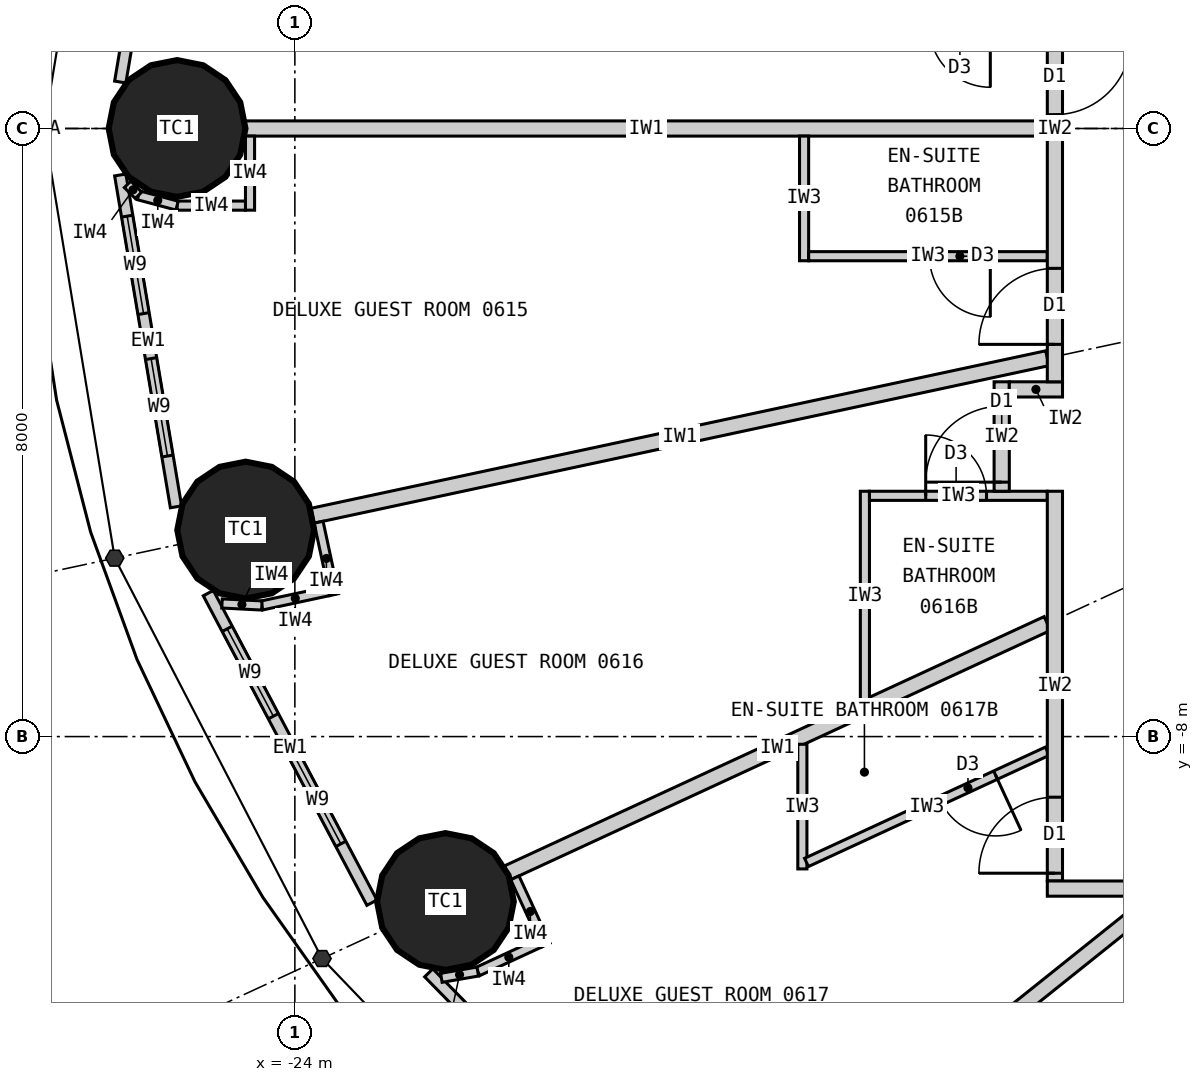
"""IFC4 building model, lengths in metres.
Left out: names, types, materials, properties, quantities, classifications, styles, units other than length and angle.
Written with IfcOpenShell. Run it as: python <this file> out.ifc"""

import sys

from ifc_helpers import new_model, si_unit, direction, frame, frame_2d, origin, origin_2d, place, context, subcontext, project, spatial, rectangle, circle, extrude, element, fill, save


model = new_model("IFC4")
c1 = context("Model", 3, precision=1e-05, world=origin(), true_north=direction((0.0, 1.0)))
c2 = subcontext(c1, "Body", "Model", "MODEL_VIEW")
j1 = project(units=[si_unit("LENGTHUNIT", "METRE"), si_unit("PLANEANGLEUNIT", "RADIAN")], contexts=[c1])
p1 = place(None, origin())
s1 = spatial("IfcSite", under=j1, at=p1, CompositionType="ELEMENT")
p2 = place(p1, origin())
s2 = spatial("IfcBuilding", under=s1, at=p2, CompositionType="ELEMENT")
p3 = place(p2, frame((0.0, 0.0, 32.7)))
s3 = spatial("IfcBuildingStorey", under=s2, at=p3, CompositionType="ELEMENT", Elevation=32.7)
for number, where, z_axis, x_axis in (
    (1, (-25.55, 0.0, 0.0), (0.0, 0.0, 1.0), (1.0, 0.0, 0.0)),
    (2, (-24.647, -5.283, 0.0), (0.0, 0.0, 1.0), (1.0, 0.0, 0.0)),
    (3, (-22.019, -10.17, 0.0), (0.0, 0.0, 1.0), (1.0, 0.0, 0.0)),
):
    element("IfcColumn", number, at=place(p3, frame(where, z_axis=z_axis, x_axis=x_axis)), inside=s3, PredefinedType="COLUMN", context=c2, shape_type="SweptSolid", body=[
        extrude(circle(Radius=0.9, at=origin_2d()), origin(), (0.0, 0.0, 1.0), 3.3),
    ])
p4 = place(p3, frame((-25.564, 4.978, 0.0), z_axis=(0.0, 0.0, 1.0), x_axis=(-0.165641751141, -0.986185991727, 0.0)))
e4 = element("IfcWall", 4, at=p4, inside=s3, PredefinedType="ELEMENTEDWALL", context=c2, shape_type="SweptSolid", body=[
    extrude(rectangle(XDim=4.428, YDim=0.15, at=frame_2d((2.214, 0.0))), origin(), (0.0, 0.0, 1.0), 3.12),
])
p5 = place(p4, frame((0.678, 0.0, 0.9)))
e5 = element("IfcOpeningElement", 5, at=p5, cuts=e4, PredefinedType="OPENING", context=c2, shape_type="SweptSolid", body=[
    extrude(rectangle(XDim=1.3, YDim=1.9, at=frame_2d((0.65, 0.95))), frame((0.0, 0.085, 0.0), z_axis=(0.0, -1.0, 0.0), x_axis=(1.0, 0.0, 0.0)), (0.0, 0.0, 1.0), 0.17),
])
p6 = place(p4, frame((2.578, 0.0, 0.9)))
e6 = element("IfcOpeningElement", 6, at=p6, cuts=e4, PredefinedType="OPENING", context=c2, shape_type="SweptSolid", body=[
    extrude(rectangle(XDim=1.3, YDim=1.9, at=frame_2d((0.65, 0.95))), frame((0.0, 0.085, 0.0), z_axis=(0.0, -1.0, 0.0), x_axis=(1.0, 0.0, 0.0)), (0.0, 0.0, 1.0), 0.17),
])
p7 = place(p3, frame((-26.297, -0.611, 0.0), z_axis=(0.0, 0.0, 1.0), x_axis=(0.165641751141, -0.986185991727, 0.0)))
e7 = element("IfcWall", 7, at=p7, inside=s3, PredefinedType="ELEMENTEDWALL", context=c2, shape_type="SweptSolid", body=[
    extrude(rectangle(XDim=4.428, YDim=0.15, at=frame_2d((2.214, 0.0))), origin(), (0.0, 0.0, 1.0), 3.12),
])
p8 = place(p7, frame((0.55, 0.0, 0.9)))
e8 = element("IfcOpeningElement", 8, at=p8, cuts=e7, PredefinedType="OPENING", context=c2, shape_type="SweptSolid", body=[
    extrude(rectangle(XDim=1.3, YDim=1.9, at=frame_2d((0.65, 0.95))), frame((0.0, 0.085, 0.0), z_axis=(0.0, -1.0, 0.0), x_axis=(1.0, 0.0, 0.0)), (0.0, 0.0, 1.0), 0.17),
])
p9 = place(p7, frame((2.45, 0.0, 0.9)))
e9 = element("IfcOpeningElement", 9, at=p9, cuts=e7, PredefinedType="OPENING", context=c2, shape_type="SweptSolid", body=[
    extrude(rectangle(XDim=1.3, YDim=1.9, at=frame_2d((0.65, 0.95))), frame((0.0, 0.085, 0.0), z_axis=(0.0, -1.0, 0.0), x_axis=(1.0, 0.0, 0.0)), (0.0, 0.0, 1.0), 0.17),
])
p10 = place(p3, frame((-25.139, -6.113, 0.0), z_axis=(0.0, 0.0, 1.0), x_axis=(0.467303182954, -0.884097129959, 0.0)))
e10 = element("IfcWall", 10, at=p10, inside=s3, PredefinedType="ELEMENTEDWALL", context=c2, shape_type="SweptSolid", body=[
    extrude(rectangle(XDim=4.606, YDim=0.15, at=frame_2d((2.303, 0.0))), origin(), (0.0, 0.0, 1.0), 3.12),
])
p11 = place(p10, frame((0.531, 0.0, 0.9)))
e11 = element("IfcOpeningElement", 11, at=p11, cuts=e10, PredefinedType="OPENING", context=c2, shape_type="SweptSolid", body=[
    extrude(rectangle(XDim=1.3, YDim=1.9, at=frame_2d((0.65, 0.95))), frame((0.0, 0.085, 0.0), z_axis=(0.0, -1.0, 0.0), x_axis=(1.0, 0.0, 0.0)), (0.0, 0.0, 1.0), 0.17),
])
p12 = place(p10, frame((2.432, 0.0, 0.9)))
e12 = element("IfcOpeningElement", 12, at=p12, cuts=e10, PredefinedType="OPENING", context=c2, shape_type="SweptSolid", body=[
    extrude(rectangle(XDim=1.3, YDim=1.9, at=frame_2d((0.65, 0.95))), frame((0.0, 0.085, 0.0), z_axis=(0.0, -1.0, 0.0), x_axis=(1.0, 0.0, 0.0)), (0.0, 0.0, 1.0), 0.17),
])
p13 = place(p3, frame((-22.239, -11.108, 0.0), z_axis=(0.0, 0.0, 1.0), x_axis=(0.699612594083, -0.714522370679, 0.0)))
e13 = element("IfcWall", 13, at=p13, inside=s3, PredefinedType="ELEMENTEDWALL", context=c2, shape_type="SweptSolid", body=[
    extrude(rectangle(XDim=4.896, YDim=0.15, at=frame_2d((2.448, 0.0))), origin(), (0.0, 0.0, 1.0), 3.12),
])
p14 = place(p13, frame((0.619, 0.0, 0.9)))
e14 = element("IfcOpeningElement", 14, at=p14, cuts=e13, PredefinedType="OPENING", context=c2, shape_type="SweptSolid", body=[
    extrude(rectangle(XDim=1.3, YDim=1.9, at=frame_2d((0.65, 0.95))), frame((0.0, 0.085, 0.0), z_axis=(0.0, -1.0, 0.0), x_axis=(1.0, 0.0, 0.0)), (0.0, 0.0, 1.0), 0.17),
])
p15 = place(p13, frame((2.519, 0.0, 0.9)))
e15 = element("IfcOpeningElement", 15, at=p15, cuts=e13, PredefinedType="OPENING", context=c2, shape_type="SweptSolid", body=[
    extrude(rectangle(XDim=1.3, YDim=1.9, at=frame_2d((0.65, 0.95))), frame((0.0, 0.085, 0.0), z_axis=(0.0, -1.0, 0.0), x_axis=(1.0, 0.0, 0.0)), (0.0, 0.0, 1.0), 0.17),
])
p16 = place(p3, frame((-14.1, 0.0, 0.0), z_axis=(0.0, 0.0, 1.0), x_axis=(-1.0, 0.0, 0.0)))
e16 = element("IfcWall", 16, at=p16, inside=s3, PredefinedType="PARTITIONING", context=c2, shape_type="SweptSolid", body=[
    extrude(rectangle(XDim=10.55, YDim=0.2, at=frame_2d((5.275, 0.0))), origin(), (0.0, 0.0, 1.0), 2.27),
])
p17 = place(p3, frame((-14.1, -3.022, 0.0), z_axis=(0.0, 0.0, 1.0), x_axis=(-0.977786510688, -0.209603290805, 0.0)))
e17 = element("IfcWall", 17, at=p17, inside=s3, PredefinedType="PARTITIONING", context=c2, shape_type="SweptSolid", body=[
    extrude(rectangle(XDim=9.887, YDim=0.2, at=frame_2d((4.943, 0.0))), origin(), (0.0, 0.0, 1.0), 2.32),
])
p18 = place(p3, frame((-14.1, -6.512, 0.0), z_axis=(0.0, 0.0, 1.0), x_axis=(-0.907842433118, -0.41931147925, 0.0)))
e18 = element("IfcWall", 18, at=p18, inside=s3, PredefinedType="PARTITIONING", context=c2, shape_type="SweptSolid", body=[
    extrude(rectangle(XDim=7.823, YDim=0.2, at=frame_2d((3.912, 0.0))), origin(), (0.0, 0.0, 1.0), 2.32),
])
p19 = place(p3, frame((-12.625, -10.1, 0.0), z_axis=(0.0, 0.0, 1.0), x_axis=(-0.780872884676, -0.624689953479, 0.0)))
e19 = element("IfcWall", 19, at=p19, inside=s3, PredefinedType="PARTITIONING", context=c2, shape_type="SweptSolid", body=[
    extrude(rectangle(XDim=5.845, YDim=0.2, at=frame_2d((2.922, 0.0))), origin(), (0.0, 0.0, 1.0), 2.32),
])
p20 = place(p3, frame((-17.3, -0.1, 0.0), z_axis=(0.0, 0.0, 1.0), x_axis=(0.0, -1.0, 0.0)))
e20 = element("IfcWall", 20, at=p20, inside=s3, PredefinedType="PARTITIONING", context=c2, shape_type="SweptSolid", body=[
    extrude(rectangle(XDim=1.64, YDim=0.12, at=frame_2d((0.82, 0.0))), origin(), (0.0, 0.0, 1.0), 3.12),
])
p21 = place(p3, frame((-14.1, -1.68, 0.0), z_axis=(0.0, 0.0, 1.0), x_axis=(-1.0, 0.0, 0.0)))
e21 = element("IfcWall", 21, at=p21, inside=s3, PredefinedType="PARTITIONING", context=c2, shape_type="SweptSolid", body=[
    extrude(rectangle(XDim=3.14, YDim=0.12, at=frame_2d((1.57, 0.0))), origin(), (0.0, 0.0, 1.0), 3.12),
])
p22 = place(p21, frame((0.75, 0.0, 0.0)))
e22 = element("IfcOpeningElement", 22, at=p22, cuts=e21, PredefinedType="OPENING", context=c2, shape_type="SweptSolid", body=[
    extrude(rectangle(XDim=0.8, YDim=2.1, at=frame_2d((0.4, 1.05))), frame((0.0, 0.07, 0.0), z_axis=(0.0, -1.0, 0.0), x_axis=(1.0, 0.0, 0.0)), (0.0, 0.0, 1.0), 0.14),
])
p23 = place(p3, frame((-16.5, -7.521, 0.0), z_axis=(0.0, 0.0, 1.0), x_axis=(0.0, 1.0, 0.0)))
e23 = element("IfcWall", 23, at=p23, inside=s3, PredefinedType="PARTITIONING", context=c2, shape_type="SweptSolid", body=[
    extrude(rectangle(XDim=2.749, YDim=0.12, at=frame_2d((1.374, 0.0))), origin(), (0.0, 0.0, 1.0), 3.12),
])
p24 = place(p3, frame((-14.1, -4.833, 0.0), z_axis=(0.0, 0.0, 1.0), x_axis=(-1.0, 0.0, 0.0)))
e24 = element("IfcWall", 24, at=p24, inside=s3, PredefinedType="PARTITIONING", context=c2, shape_type="SweptSolid", body=[
    extrude(rectangle(XDim=2.34, YDim=0.12, at=frame_2d((1.17, 0.0))), origin(), (0.0, 0.0, 1.0), 3.12),
])
p25 = place(p24, frame((0.8, 0.0, 0.0)))
e25 = element("IfcOpeningElement", 25, at=p25, cuts=e24, PredefinedType="OPENING", context=c2, shape_type="SweptSolid", body=[
    extrude(rectangle(XDim=0.8, YDim=2.1, at=frame_2d((0.4, 1.05))), frame((0.0, 0.07, 0.0), z_axis=(0.0, -1.0, 0.0), x_axis=(1.0, 0.0, 0.0)), (0.0, 0.0, 1.0), 0.14),
])
p26 = place(p3, frame((-17.323, -8.101, 0.0), z_axis=(0.0, 0.0, 1.0), x_axis=(0.0, -1.0, 0.0)))
e26 = element("IfcWall", 26, at=p26, inside=s3, PredefinedType="PARTITIONING", context=c2, shape_type="SweptSolid", body=[
    extrude(rectangle(XDim=1.64, YDim=0.12, at=frame_2d((0.82, 0.0))), origin(), (0.0, 0.0, 1.0), 3.12),
])
p27 = place(p3, frame((-14.1, -8.193, 0.0), z_axis=(0.0, 0.0, 1.0), x_axis=(-0.907836493557, -0.419324338628, 0.0)))
e27 = element("IfcWall", 27, at=p27, inside=s3, PredefinedType="PARTITIONING", context=c2, shape_type="SweptSolid", body=[
    extrude(rectangle(XDim=3.49, YDim=0.12, at=frame_2d((1.745, 0.0))), origin(), (0.0, 0.0, 1.0), 3.12),
])
p28 = place(p27, frame((0.75, 0.0, 0.0)))
e28 = element("IfcOpeningElement", 28, at=p28, cuts=e27, PredefinedType="OPENING", context=c2, shape_type="SweptSolid", body=[
    extrude(rectangle(XDim=0.8, YDim=2.1, at=frame_2d((0.4, 1.05))), frame((0.0, 0.07, 0.0), z_axis=(0.0, -1.0, 0.0), x_axis=(1.0, 0.0, 0.0)), (0.0, 0.0, 1.0), 0.14),
])
p29 = place(p3, frame((-14.7, -3.333, 0.0), z_axis=(0.0, 0.0, 1.0), x_axis=(0.0, -1.0, 0.0)))
e29 = element("IfcWall", 29, at=p29, inside=s3, PredefinedType="PARTITIONING", context=c2, shape_type="SweptSolid", body=[
    extrude(rectangle(XDim=1.44, YDim=0.2, at=frame_2d((0.72, 0.0))), origin(), (0.0, 0.0, 1.0), 3.12),
])
p30 = place(p29, frame((0.32, 0.0, 0.0)))
e30 = element("IfcOpeningElement", 30, at=p30, cuts=e29, PredefinedType="OPENING", context=c2, shape_type="SweptSolid", body=[
    extrude(rectangle(XDim=1.0, YDim=2.2, at=frame_2d((0.5, 1.1))), frame((0.0, 0.11, 0.0), z_axis=(0.0, -1.0, 0.0), x_axis=(1.0, 0.0, 0.0)), (0.0, 0.0, 1.0), 0.22),
])
p31 = place(p3, frame((-13.9, -3.433, 0.0), z_axis=(0.0, 0.0, 1.0), x_axis=(-1.0, 0.0, 0.0)))
e31 = element("IfcWall", 31, at=p31, inside=s3, PredefinedType="PARTITIONING", context=c2, shape_type="SweptSolid", body=[
    extrude(rectangle(XDim=0.7, YDim=0.2, at=frame_2d((0.35, 0.0))), origin(), (0.0, 0.0, 1.0), 2.32),
])
p32 = place(p3, frame((-14.0, 3.333, 0.0), z_axis=(0.0, 0.0, 1.0), x_axis=(0.0, -1.0, 0.0)))
e32 = element("IfcWall", 32, at=p32, inside=s3, PredefinedType="PARTITIONING", context=c2, shape_type="SweptSolid", body=[
    extrude(rectangle(XDim=6.665, YDim=0.2, at=frame_2d((3.333, 0.0))), origin(), (0.0, 0.0, 1.0), 3.12),
])
p33 = place(p32, frame((2.15, 0.0, 0.0)))
e33 = element("IfcOpeningElement", 33, at=p33, cuts=e32, PredefinedType="OPENING", context=c2, shape_type="SweptSolid", body=[
    extrude(rectangle(XDim=1.0, YDim=2.2, at=frame_2d((0.5, 1.1))), frame((0.0, 0.11, 0.0), z_axis=(0.0, -1.0, 0.0), x_axis=(1.0, 0.0, 0.0)), (0.0, 0.0, 1.0), 0.22),
])
p34 = place(p32, frame((5.173, 0.0, 0.0)))
e34 = element("IfcOpeningElement", 34, at=p34, cuts=e32, PredefinedType="OPENING", context=c2, shape_type="SweptSolid", body=[
    extrude(rectangle(XDim=1.0, YDim=2.2, at=frame_2d((0.5, 1.1))), frame((0.0, 0.11, 0.0), z_axis=(0.0, -1.0, 0.0), x_axis=(1.0, 0.0, 0.0)), (0.0, 0.0, 1.0), 0.22),
])
p35 = place(p3, frame((-14.0, -4.772, 0.0), z_axis=(0.0, 0.0, 1.0), x_axis=(0.0, -1.0, 0.0)))
e35 = element("IfcWall", 35, at=p35, inside=s3, PredefinedType="PARTITIONING", context=c2, shape_type="SweptSolid", body=[
    extrude(rectangle(XDim=5.127, YDim=0.2, at=frame_2d((2.564, 0.0))), origin(), (0.0, 0.0, 1.0), 3.12),
])
p36 = place(p35, frame((4.025, 0.0, 0.0)))
e36 = element("IfcOpeningElement", 36, at=p36, cuts=e35, PredefinedType="OPENING", context=c2, shape_type="SweptSolid", body=[
    extrude(rectangle(XDim=1.0, YDim=2.2, at=frame_2d((0.5, 1.1))), frame((0.0, 0.11, 0.0), z_axis=(0.0, -1.0, 0.0), x_axis=(1.0, 0.0, 0.0)), (0.0, 0.0, 1.0), 0.22),
])
p37 = place(p3, frame((-3.499, -10.0, 0.0), z_axis=(0.0, 0.0, 1.0), x_axis=(-1.0, 0.0, 0.0)))
e37 = element("IfcWall", 37, at=p37, inside=s3, PredefinedType="PARTITIONING", context=c2, shape_type="SweptSolid", body=[
    extrude(rectangle(XDim=10.602, YDim=0.2, at=frame_2d((5.301, 0.0))), origin(), (0.0, 0.0, 1.0), 3.12),
])
p38 = place(p37, frame((4.846, 0.0, 0.0)))
e38 = element("IfcOpeningElement", 38, at=p38, cuts=e37, PredefinedType="OPENING", context=c2, shape_type="SweptSolid", body=[
    extrude(rectangle(XDim=1.0, YDim=2.2, at=frame_2d((0.5, 1.1))), frame((0.0, 0.11, 0.0), z_axis=(0.0, -1.0, 0.0), x_axis=(1.0, 0.0, 0.0)), (0.0, 0.0, 1.0), 0.22),
])
p39 = place(p3, frame((-24.59, -0.1, 0.0), z_axis=(0.0, 0.0, 1.0), x_axis=(0.0, -1.0, 0.0)))
e39 = element("IfcWall", 39, at=p39, inside=s3, PredefinedType="PARTITIONING", context=c2, shape_type="SweptSolid", body=[
    extrude(rectangle(XDim=0.974, YDim=0.12, at=frame_2d((0.487, 0.0))), origin(), (0.0, 0.0, 1.0), 3.12),
])
p40 = place(p3, frame((-24.65, -1.015, 0.0), z_axis=(0.0, 0.0, 1.0), x_axis=(-1.0, 0.0, 0.0)))
e40 = element("IfcWall", 40, at=p40, inside=s3, PredefinedType="PARTITIONING", context=c2, shape_type="SweptSolid", body=[
    extrude(rectangle(XDim=0.9, YDim=0.12, at=frame_2d((0.45, 0.0))), origin(), (0.0, 0.0, 1.0), 3.12),
])
p41 = place(p3, frame((-25.55, -1.015, 0.0), z_axis=(0.0, 0.0, 1.0), x_axis=(-0.96590239779, 0.258906465625, 0.0)))
e41 = element("IfcWall", 41, at=p41, inside=s3, PredefinedType="PARTITIONING", context=c2, shape_type="SweptSolid", body=[
    extrude(rectangle(XDim=0.525, YDim=0.12, at=frame_2d((0.263, 0.0))), origin(), (0.0, 0.0, 1.0), 3.12),
])
p42 = place(p3, frame((-26.057, -0.879, 0.0), z_axis=(0.0, 0.0, 1.0), x_axis=(-0.707106781187, 0.707106781187, 0.0)))
e42 = element("IfcWall", 42, at=p42, inside=s3, PredefinedType="PARTITIONING", context=c2, shape_type="SweptSolid", body=[
    extrude(rectangle(XDim=0.204, YDim=0.12, at=frame_2d((0.102, 0.0))), origin(), (0.0, 0.0, 1.0), 3.12),
])
p43 = place(p3, frame((-23.687, -5.18, 0.0), z_axis=(0.0, 0.0, 1.0), x_axis=(0.209443540911, -0.977820741839, 0.0)))
e43 = element("IfcWall", 43, at=p43, inside=s3, PredefinedType="PARTITIONING", context=c2, shape_type="SweptSolid", body=[
    extrude(rectangle(XDim=0.975, YDim=0.12, at=frame_2d((0.487, 0.0))), origin(), (0.0, 0.0, 1.0), 3.12),
])
p44 = place(p3, frame((-23.554, -6.087, 0.0), z_axis=(0.0, 0.0, 1.0), x_axis=(-0.977762694187, -0.209714362543, 0.0)))
e44 = element("IfcWall", 44, at=p44, inside=s3, PredefinedType="PARTITIONING", context=c2, shape_type="SweptSolid", body=[
    extrude(rectangle(XDim=0.9, YDim=0.12, at=frame_2d((0.45, 0.0))), origin(), (0.0, 0.0, 1.0), 3.12),
])
p45 = place(p3, frame((-24.434, -6.275, 0.0), z_axis=(0.0, 0.0, 1.0), x_axis=(-0.998714959873, 0.050679669751, 0.0)))
e45 = element("IfcWall", 45, at=p45, inside=s3, PredefinedType="PARTITIONING", context=c2, shape_type="SweptSolid", body=[
    extrude(rectangle(XDim=0.525, YDim=0.12, at=frame_2d((0.263, 0.0))), origin(), (0.0, 0.0, 1.0), 3.12),
])
p46 = place(p3, frame((-21.106, -9.858, 0.0), z_axis=(0.0, 0.0, 1.0), x_axis=(0.419344098106, -0.907827366509, 0.0)))
e46 = element("IfcWall", 46, at=p46, inside=s3, PredefinedType="PARTITIONING", context=c2, shape_type="SweptSolid", body=[
    extrude(rectangle(XDim=0.975, YDim=0.12, at=frame_2d((0.487, 0.0))), origin(), (0.0, 0.0, 1.0), 3.12),
])
p47 = place(p3, frame((-20.777, -10.714, 0.0), z_axis=(0.0, 0.0, 1.0), x_axis=(-0.907832324198, -0.419333365166, 0.0)))
e47 = element("IfcWall", 47, at=p47, inside=s3, PredefinedType="PARTITIONING", context=c2, shape_type="SweptSolid", body=[
    extrude(rectangle(XDim=0.9, YDim=0.12, at=frame_2d((0.45, 0.0))), origin(), (0.0, 0.0, 1.0), 3.12),
])
p48 = place(p3, frame((-21.594, -11.091, 0.0), z_axis=(0.0, 0.0, 1.0), x_axis=(-0.985483306792, -0.169772353566, 0.0)))
e48 = element("IfcWall", 48, at=p48, inside=s3, PredefinedType="PARTITIONING", context=c2, shape_type="SweptSolid", body=[
    extrude(rectangle(XDim=0.486, YDim=0.12, at=frame_2d((0.243, 0.0))), origin(), (0.0, 0.0, 1.0), 3.12),
])
p49 = place(p8, origin())
e49 = element("IfcWindow", 49, at=p49, inside=s3, PartitioningType="SINGLE_PANEL", PredefinedType="WINDOW", context=c2, shape_type="SweptSolid", body=[
    extrude(rectangle(XDim=1.3, YDim=1.9, at=frame_2d((0.65, 0.95))), frame((0.0, 0.03, 0.0), z_axis=(0.0, -1.0, 0.0), x_axis=(1.0, 0.0, 0.0)), (0.0, 0.0, 1.0), 0.06),
])
fill(e8, e49)
p50 = place(p9, origin())
e50 = element("IfcWindow", 50, at=p50, inside=s3, PartitioningType="SINGLE_PANEL", PredefinedType="WINDOW", context=c2, shape_type="SweptSolid", body=[
    extrude(rectangle(XDim=1.3, YDim=1.9, at=frame_2d((0.65, 0.95))), frame((0.0, 0.03, 0.0), z_axis=(0.0, -1.0, 0.0), x_axis=(1.0, 0.0, 0.0)), (0.0, 0.0, 1.0), 0.06),
])
fill(e9, e50)
p51 = place(p11, origin())
e51 = element("IfcWindow", 51, at=p51, inside=s3, PartitioningType="SINGLE_PANEL", PredefinedType="WINDOW", context=c2, shape_type="SweptSolid", body=[
    extrude(rectangle(XDim=1.3, YDim=1.9, at=frame_2d((0.65, 0.95))), frame((0.0, 0.03, 0.0), z_axis=(0.0, -1.0, 0.0), x_axis=(1.0, 0.0, 0.0)), (0.0, 0.0, 1.0), 0.06),
])
fill(e11, e51)
p52 = place(p12, origin())
e52 = element("IfcWindow", 52, at=p52, inside=s3, PartitioningType="SINGLE_PANEL", PredefinedType="WINDOW", context=c2, shape_type="SweptSolid", body=[
    extrude(rectangle(XDim=1.3, YDim=1.9, at=frame_2d((0.65, 0.95))), frame((0.0, 0.03, 0.0), z_axis=(0.0, -1.0, 0.0), x_axis=(1.0, 0.0, 0.0)), (0.0, 0.0, 1.0), 0.06),
])
fill(e12, e52)
p53 = place(p33, origin())
e53 = element("IfcDoor", 53, at=p53, inside=s3, OperationType="SINGLE_SWING_LEFT", PredefinedType="DOOR", context=c2, shape_type="SweptSolid", body=[
    extrude(rectangle(XDim=1.0, YDim=2.2, at=frame_2d((0.5, 1.1))), frame((0.0, 0.025, 0.0), z_axis=(0.0, -1.0, 0.0), x_axis=(1.0, 0.0, 0.0)), (0.0, 0.0, 1.0), 0.05),
])
fill(e33, e53)
p54 = place(p22, origin())
e54 = element("IfcDoor", 54, at=p54, inside=s3, OperationType="SINGLE_SWING_LEFT", PredefinedType="DOOR", context=c2, shape_type="SweptSolid", body=[
    extrude(rectangle(XDim=0.8, YDim=2.1, at=frame_2d((0.4, 1.05))), frame((0.0, 0.025, 0.0), z_axis=(0.0, -1.0, 0.0), x_axis=(1.0, 0.0, 0.0)), (0.0, 0.0, 1.0), 0.05),
])
fill(e22, e54)
p55 = place(p34, origin())
e55 = element("IfcDoor", 55, at=p55, inside=s3, OperationType="SINGLE_SWING_RIGHT", PredefinedType="DOOR", context=c2, shape_type="SweptSolid", body=[
    extrude(rectangle(XDim=1.0, YDim=2.2, at=frame_2d((0.5, 1.1))), frame((0.0, 0.025, 0.0), z_axis=(0.0, -1.0, 0.0), x_axis=(1.0, 0.0, 0.0)), (0.0, 0.0, 1.0), 0.05),
])
fill(e34, e55)
p56 = place(p25, origin())
e56 = element("IfcDoor", 56, at=p56, inside=s3, OperationType="SINGLE_SWING_RIGHT", PredefinedType="DOOR", context=c2, shape_type="SweptSolid", body=[
    extrude(rectangle(XDim=0.8, YDim=2.1, at=frame_2d((0.4, 1.05))), frame((0.0, 0.025, 0.0), z_axis=(0.0, -1.0, 0.0), x_axis=(1.0, 0.0, 0.0)), (0.0, 0.0, 1.0), 0.05),
])
fill(e25, e56)
p57 = place(p30, origin())
e57 = element("IfcDoor", 57, at=p57, inside=s3, OperationType="SINGLE_SWING_RIGHT", PredefinedType="DOOR", context=c2, shape_type="SweptSolid", body=[
    extrude(rectangle(XDim=1.0, YDim=2.2, at=frame_2d((0.5, 1.1))), frame((0.0, 0.025, 0.0), z_axis=(0.0, -1.0, 0.0), x_axis=(1.0, 0.0, 0.0)), (0.0, 0.0, 1.0), 0.05),
])
fill(e30, e57)
p58 = place(p28, origin())
e58 = element("IfcDoor", 58, at=p58, inside=s3, OperationType="SINGLE_SWING_LEFT", PredefinedType="DOOR", context=c2, shape_type="SweptSolid", body=[
    extrude(rectangle(XDim=0.8, YDim=2.1, at=frame_2d((0.4, 1.05))), frame((0.0, 0.025, 0.0), z_axis=(0.0, -1.0, 0.0), x_axis=(1.0, 0.0, 0.0)), (0.0, 0.0, 1.0), 0.05),
])
fill(e28, e58)
p59 = place(p36, origin())
e59 = element("IfcDoor", 59, at=p59, inside=s3, OperationType="SINGLE_SWING_RIGHT", PredefinedType="DOOR", context=c2, shape_type="SweptSolid", body=[
    extrude(rectangle(XDim=1.0, YDim=2.2, at=frame_2d((0.5, 1.1))), frame((0.0, 0.025, 0.0), z_axis=(0.0, -1.0, 0.0), x_axis=(1.0, 0.0, 0.0)), (0.0, 0.0, 1.0), 0.05),
])
fill(e36, e59)
save(model, sys.argv[1])
